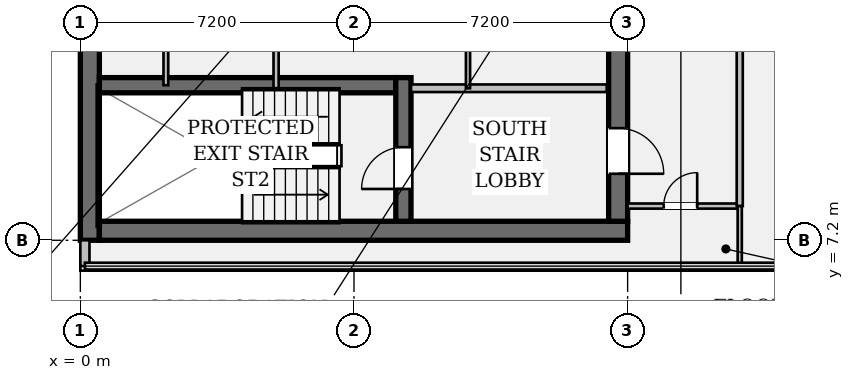
"""IFC4 building model, lengths in metres.
Left out: names, types, materials, properties, quantities, classifications, styles, units other than length and angle.
Written with IfcOpenShell. Run it as: python <this file> out.ifc"""

import sys

from ifc_helpers import new_model, si_unit, direction, frame, frame_2d, origin, place, context, subcontext, project, spatial, rectangle, extrude, element, fill, save


model = new_model("IFC4")
c1 = context("Model", 3, precision=1e-05, world=origin(), true_north=direction((0.0, 1.0)))
c2 = subcontext(c1, "Body", "Model", "MODEL_VIEW")
j1 = project(units=[si_unit("LENGTHUNIT", "METRE"), si_unit("PLANEANGLEUNIT", "RADIAN")], contexts=[c1])
p1 = place(None, origin())
s1 = spatial("IfcSite", under=j1, at=p1, CompositionType="ELEMENT")
p2 = place(p1, origin())
s2 = spatial("IfcBuilding", under=s1, at=p2, CompositionType="ELEMENT")
p3 = place(p2, frame((0.0, 0.0, 269.15)))
s3 = spatial("IfcBuildingStorey", under=s2, at=p3, CompositionType="ELEMENT", Elevation=269.15)
p4 = place(p3, frame((0.25, 7.2, 0.0), z_axis=(0.0, 0.0, 1.0), x_axis=(0.0, 1.0, 0.0)))
e1 = element("IfcWall", 1, at=p4, inside=s3, PredefinedType="SHEAR", context=c2, shape_type="SweptSolid", body=[
    extrude(rectangle(XDim=28.8, YDim=0.5, at=frame_2d((14.4, 0.0))), origin(), (0.0, 0.0, 1.0), 3.24),
])
p5 = place(p3, frame((0.5, 7.45, 0.0), z_axis=(0.0, 0.0, 1.0), x_axis=(1.0, 0.0, 0.0)))
e2 = element("IfcWall", 2, at=p5, inside=s3, PredefinedType="SHEAR", context=c2, shape_type="SweptSolid", body=[
    extrude(rectangle(XDim=13.9, YDim=0.5, at=frame_2d((6.95, 0.0))), origin(), (0.0, 0.0, 1.0), 3.24),
])
p6 = place(p3, frame((14.15, 35.5, 0.0), z_axis=(0.0, 0.0, 1.0), x_axis=(0.0, -1.0, 0.0)))
e3 = element("IfcWall", 3, at=p6, inside=s3, PredefinedType="SHEAR", context=c2, shape_type="SweptSolid", body=[
    extrude(rectangle(XDim=27.8, YDim=0.5, at=frame_2d((13.9, 0.0))), origin(), (0.0, 0.0, 1.0), 3.24),
])
p7 = place(p6, frame((1.4, 0.0, 0.0)))
e4 = element("IfcOpeningElement", 4, at=p7, cuts=e3, PredefinedType="OPENING", context=c2, shape_type="SweptSolid", body=[
    extrude(rectangle(XDim=1.2, YDim=2.15, at=frame_2d((0.6, 1.075))), frame((0.0, 0.262, 0.0), z_axis=(0.0, -1.0, 0.0), x_axis=(1.0, 0.0, 0.0)), (0.0, 0.0, 1.0), 0.524),
])
p8 = place(p6, frame((25.35, 0.0, 0.0)))
e5 = element("IfcOpeningElement", 5, at=p8, cuts=e3, PredefinedType="OPENING", context=c2, shape_type="SweptSolid", body=[
    extrude(rectangle(XDim=1.2, YDim=2.15, at=frame_2d((0.6, 1.075))), frame((0.0, 0.262, 0.0), z_axis=(0.0, -1.0, 0.0), x_axis=(1.0, 0.0, 0.0)), (0.0, 0.0, 1.0), 0.524),
])
p9 = place(p6, frame((14.7, 0.0, 0.0)))
e6 = element("IfcOpeningElement", 6, at=p9, cuts=e3, PredefinedType="OPENING", context=c2, shape_type="SweptSolid", body=[
    extrude(rectangle(XDim=1.6, YDim=2.2, at=frame_2d((0.8, 1.1))), frame((0.0, 0.262, 0.0), z_axis=(0.0, -1.0, 0.0), x_axis=(1.0, 0.0, 0.0)), (0.0, 0.0, 1.0), 0.524),
])
p10 = place(p3, frame((0.5, 11.28, 0.0), z_axis=(0.0, 0.0, 1.0), x_axis=(1.0, 0.0, 0.0)))
e7 = element("IfcWall", 7, at=p10, inside=s3, PredefinedType="SHEAR", context=c2, shape_type="SweptSolid", body=[
    extrude(rectangle(XDim=7.8, YDim=0.4, at=frame_2d((3.9, 0.0))), origin(), (0.0, 0.0, 1.0), 3.24),
])
p11 = place(p3, frame((8.5, 7.7, 0.0), z_axis=(0.0, 0.0, 1.0), x_axis=(0.0, 1.0, 0.0)))
e8 = element("IfcWall", 8, at=p11, inside=s3, PredefinedType="SHEAR", context=c2, shape_type="SweptSolid", body=[
    extrude(rectangle(XDim=3.78, YDim=0.4, at=frame_2d((1.89, 0.0))), origin(), (0.0, 0.0, 1.0), 3.24),
])
p12 = place(p11, frame((0.85, 0.0, 0.0)))
e9 = element("IfcOpeningElement", 9, at=p12, cuts=e8, PredefinedType="OPENING", context=c2, shape_type="SweptSolid", body=[
    extrude(rectangle(XDim=1.1, YDim=2.15, at=frame_2d((0.55, 1.075))), frame((0.0, 0.212, 0.0), z_axis=(0.0, -1.0, 0.0), x_axis=(1.0, 0.0, 0.0)), (0.0, 0.0, 1.0), 0.424),
])
p13 = place(p3, frame((0.12, 6.52, 0.0), z_axis=(0.0, 0.0, 1.0), x_axis=(0.0, 1.0, 0.0)))
e10 = element("IfcWall", 10, at=p13, inside=s3, PredefinedType="STANDARD", context=c2, shape_type="SweptSolid", body=[
    extrude(rectangle(XDim=0.68, YDim=0.24, at=frame_2d((0.34, 0.0))), origin(), (0.0, 0.0, 1.0), 3.24),
])
p14 = place(p3, frame((8.7, 11.2, 0.0), z_axis=(0.0, 0.0, 1.0), x_axis=(1.0, 0.0, 0.0)))
e11 = element("IfcWall", 11, at=p14, inside=s3, PredefinedType="PARTITIONING", context=c2, shape_type="SweptSolid", body=[
    extrude(rectangle(XDim=5.15, YDim=0.2, at=frame_2d((2.575, 0.0))), origin(), (0.0, 0.0, 1.0), 3.24),
])
p15 = place(p3, frame((5.15, 11.2, 0.0), z_axis=(0.0, 0.0, 1.0), x_axis=(0.0, 1.0, 0.0)))
e12 = element("IfcWall", 12, at=p15, inside=s3, PredefinedType="PARTITIONING", context=c2, shape_type="SweptSolid", body=[
    extrude(rectangle(XDim=6.6, YDim=0.135, at=frame_2d((3.3, 0.0))), origin(), (0.0, 0.0, 1.0), 3.24),
])
p16 = place(p3, frame((10.2, 11.2, 0.0), z_axis=(0.0, 0.0, 1.0), x_axis=(0.0, 1.0, 0.0)))
e13 = element("IfcWall", 13, at=p16, inside=s3, PredefinedType="PARTITIONING", context=c2, shape_type="SweptSolid", body=[
    extrude(rectangle(XDim=6.6, YDim=0.11, at=frame_2d((3.3, 0.0))), origin(), (0.0, 0.0, 1.0), 3.24),
])
p17 = place(p3, frame((2.25, 11.28, 0.0), z_axis=(0.0, 0.0, 1.0), x_axis=(0.0, 1.0, 0.0)))
e14 = element("IfcWall", 14, at=p17, inside=s3, PredefinedType="PARTITIONING", context=c2, shape_type="SweptSolid", body=[
    extrude(rectangle(XDim=4.42, YDim=0.125, at=frame_2d((2.21, 0.0))), origin(), (0.0, 0.0, 1.0), 3.24),
])
p18 = place(p17, frame((1.65, 0.0, 0.0)))
e15 = element("IfcOpeningElement", 15, at=p18, cuts=e14, PredefinedType="OPENING", context=c2, shape_type="SweptSolid", body=[
    extrude(rectangle(XDim=0.85, YDim=2.15, at=frame_2d((0.425, 1.075))), frame((0.0, 0.074, 0.0), z_axis=(0.0, -1.0, 0.0), x_axis=(1.0, 0.0, 0.0)), (0.0, 0.0, 1.0), 0.149),
])
p19 = place(p3, frame((14.4, 8.1, 0.0), z_axis=(0.0, 0.0, 1.0), x_axis=(1.0, 0.0, 0.0)))
e16 = element("IfcWall", 16, at=p19, inside=s3, PredefinedType="PARTITIONING", context=c2, shape_type="SweptSolid", body=[
    extrude(rectangle(XDim=2.95, YDim=0.135, at=frame_2d((1.475, 0.0))), origin(), (0.0, 0.0, 1.0), 3.24),
])
p20 = place(p19, frame((0.95, 0.0, 0.0)))
e17 = element("IfcOpeningElement", 17, at=p20, cuts=e16, PredefinedType="OPENING", context=c2, shape_type="SweptSolid", body=[
    extrude(rectangle(XDim=0.88, YDim=2.15, at=frame_2d((0.44, 1.075))), frame((0.0, 0.08, 0.0), z_axis=(0.0, -1.0, 0.0), x_axis=(1.0, 0.0, 0.0)), (0.0, 0.0, 1.0), 0.159),
])
p21 = place(p3, frame((17.35, 8.1, 0.0), z_axis=(0.0, 0.0, 1.0), x_axis=(0.0, 1.0, 0.0)))
e18 = element("IfcWall", 18, at=p21, inside=s3, PredefinedType="PARTITIONING", context=c2, shape_type="SweptSolid", body=[
    extrude(rectangle(XDim=9.8, YDim=0.16, at=frame_2d((4.9, 0.0))), origin(), (0.0, 0.0, 1.0), 2.676),
])
p22 = place(p3, frame((17.35, 6.52, 0.0), z_axis=(0.0, 0.0, 1.0), x_axis=(0.0, 1.0, 0.0)))
e19 = element("IfcWall", 19, at=p22, inside=s3, PredefinedType="PARTITIONING", context=c2, shape_type="SweptSolid", body=[
    extrude(rectangle(XDim=1.58, YDim=0.11, at=frame_2d((0.79, 0.0))), origin(), (0.0, 0.0, 1.0), 3.24),
])
p23 = place(p12, origin())
e20 = element("IfcDoor", 20, at=p23, inside=s3, OperationType="SINGLE_SWING_LEFT", PredefinedType="DOOR", context=c2, shape_type="SweptSolid", body=[
    extrude(rectangle(XDim=1.1, YDim=2.15, at=frame_2d((0.55, 1.075))), frame((0.0, 0.025, 0.0), z_axis=(0.0, -1.0, 0.0), x_axis=(1.0, 0.0, 0.0)), (0.0, 0.0, 1.0), 0.05),
])
fill(e9, e20)
p24 = place(p8, origin())
e21 = element("IfcDoor", 21, at=p24, inside=s3, OperationType="SINGLE_SWING_RIGHT", PredefinedType="DOOR", context=c2, shape_type="SweptSolid", body=[
    extrude(rectangle(XDim=1.2, YDim=2.15, at=frame_2d((0.6, 1.075))), frame((0.0, 0.025, 0.0), z_axis=(0.0, -1.0, 0.0), x_axis=(1.0, 0.0, 0.0)), (0.0, 0.0, 1.0), 0.05),
])
fill(e5, e21)
p25 = place(p20, origin())
e22 = element("IfcDoor", 22, at=p25, inside=s3, OperationType="SINGLE_SWING_RIGHT", PredefinedType="DOOR", context=c2, shape_type="SweptSolid", body=[
    extrude(rectangle(XDim=0.88, YDim=2.15, at=frame_2d((0.44, 1.075))), frame((0.0, 0.025, 0.0), z_axis=(0.0, -1.0, 0.0), x_axis=(1.0, 0.0, 0.0)), (0.0, 0.0, 1.0), 0.05),
])
fill(e17, e22)
save(model, sys.argv[1])
